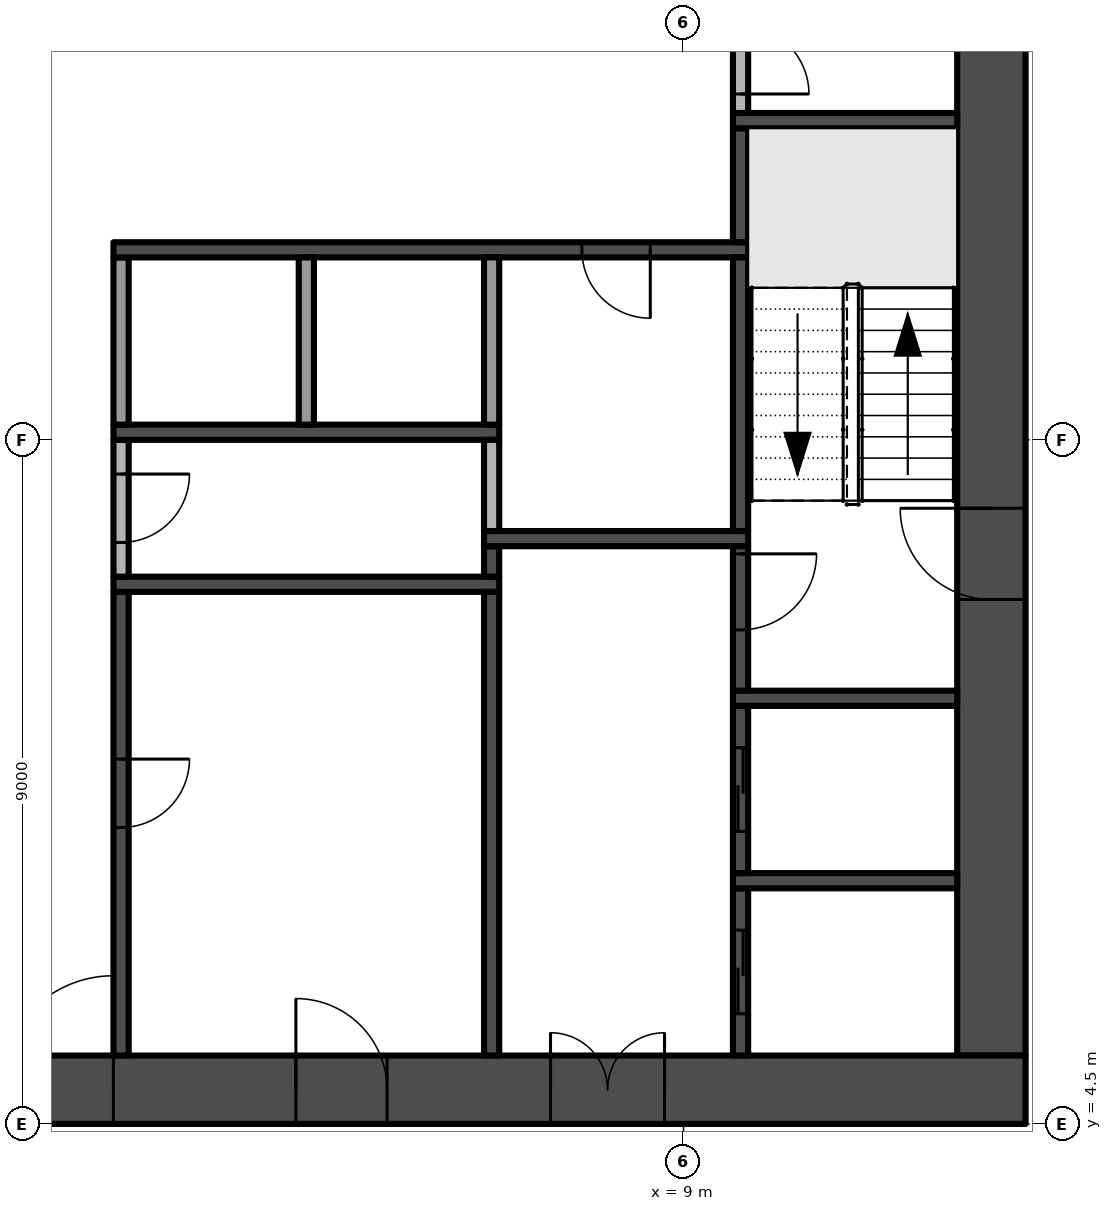
"""IFC4 building model, lengths in metres.
Left out: names, types, materials, properties, quantities, classifications, styles, units other than length and angle.
Written with IfcOpenShell. Run it as: python <this file> out.ifc"""

import sys

from ifc_helpers import new_model, si_unit, direction, frame, frame_2d, origin, place, context, subcontext, project, spatial, rectangle, extrude, element, fill, save


model = new_model("IFC4")
c1 = context("Model", 3, precision=1e-05, world=origin(), true_north=direction((0.0, 1.0)))
c2 = subcontext(c1, "Body", "Model", "MODEL_VIEW")
j1 = project(units=[si_unit("LENGTHUNIT", "METRE"), si_unit("PLANEANGLEUNIT", "RADIAN")], contexts=[c1])
p1 = place(None, origin())
s1 = spatial("IfcSite", under=j1, at=p1, CompositionType="ELEMENT")
p2 = place(p1, origin())
s2 = spatial("IfcBuilding", under=s1, at=p2, CompositionType="ELEMENT")
p3 = place(p2, frame((0.0, 0.0, 22.6)))
s3 = spatial("IfcBuildingStorey", under=s2, at=p3, CompositionType="ELEMENT", Elevation=22.6)
p4 = place(p3, frame((-13.5, 4.95, -0.3), z_axis=(0.0, 0.0, 1.0), x_axis=(1.0, 0.0, 0.0)))
e1 = element("IfcWall", 1, at=p4, inside=s3, PredefinedType="SHEAR", context=c2, shape_type="SweptSolid", body=[
    extrude(rectangle(XDim=27.0, YDim=0.9, at=frame_2d((13.5, 0.0))), origin(), (0.0, 0.0, 1.0), 3.8),
])
p5 = place(p4, frame((12.0, 0.0, 0.3)))
e2 = element("IfcOpeningElement", 2, at=p5, cuts=e1, PredefinedType="OPENING", context=c2, shape_type="SweptSolid", body=[
    extrude(rectangle(XDim=3.0, YDim=2.4, at=frame_2d((1.5, 1.2))), frame((0.0, 0.46, 0.0), z_axis=(0.0, -1.0, 0.0), x_axis=(1.0, 0.0, 0.0)), (0.0, 0.0, 1.0), 0.92),
])
p6 = place(p4, frame((4.9, 0.0, 0.3)))
e3 = element("IfcOpeningElement", 3, at=p6, cuts=e1, PredefinedType="OPENING", context=c2, shape_type="SweptSolid", body=[
    extrude(rectangle(XDim=1.2, YDim=2.2, at=frame_2d((0.6, 1.1))), frame((0.0, 0.46, 0.0), z_axis=(0.0, -1.0, 0.0), x_axis=(1.0, 0.0, 0.0)), (0.0, 0.0, 1.0), 0.92),
])
p7 = place(p4, frame((20.75, 0.0, 0.3)))
e4 = element("IfcOpeningElement", 4, at=p7, cuts=e1, PredefinedType="OPENING", context=c2, shape_type="SweptSolid", body=[
    extrude(rectangle(XDim=1.5, YDim=2.2, at=frame_2d((0.75, 1.1))), frame((0.0, 0.46, 0.0), z_axis=(0.0, -1.0, 0.0), x_axis=(1.0, 0.0, 0.0)), (0.0, 0.0, 1.0), 0.92),
])
p8 = place(p4, frame((17.4, 0.0, 0.3)))
e5 = element("IfcOpeningElement", 5, at=p8, cuts=e1, PredefinedType="OPENING", context=c2, shape_type="SweptSolid", body=[
    extrude(rectangle(XDim=1.2, YDim=2.2, at=frame_2d((0.6, 1.1))), frame((0.0, 0.46, 0.0), z_axis=(0.0, -1.0, 0.0), x_axis=(1.0, 0.0, 0.0)), (0.0, 0.0, 1.0), 0.92),
])
p9 = place(p3, frame((13.05, 5.4, -0.3), z_axis=(0.0, 0.0, 1.0), x_axis=(0.0, 1.0, 0.0)))
e6 = element("IfcWall", 6, at=p9, inside=s3, PredefinedType="SHEAR", context=c2, shape_type="SweptSolid", body=[
    extrude(rectangle(XDim=16.2, YDim=0.9, at=frame_2d((8.1, 0.0))), origin(), (0.0, 0.0, 1.0), 3.8),
])
p10 = place(p9, frame((6.0, 0.0, 0.3)))
e7 = element("IfcOpeningElement", 7, at=p10, cuts=e6, PredefinedType="OPENING", context=c2, shape_type="SweptSolid", body=[
    extrude(rectangle(XDim=1.2, YDim=2.2, at=frame_2d((0.6, 1.1))), frame((0.0, 0.46, 0.0), z_axis=(0.0, -1.0, 0.0), x_axis=(1.0, 0.0, 0.0)), (0.0, 0.0, 1.0), 0.92),
])
p11 = place(p3, frame((1.6, 11.5, 0.0), z_axis=(0.0, 0.0, 1.0), x_axis=(0.0, -1.0, 0.0)))
e8 = element("IfcWall", 8, at=p11, inside=s3, PredefinedType="SHEAR", context=c2, shape_type="SweptSolid", body=[
    extrude(rectangle(XDim=6.1, YDim=0.2, at=frame_2d((3.05, 0.0))), origin(), (0.0, 0.0, 1.0), 3.5),
])
p12 = place(p11, frame((2.2, 0.0, 0.0)))
e9 = element("IfcOpeningElement", 9, at=p12, cuts=e8, PredefinedType="OPENING", context=c2, shape_type="SweptSolid", body=[
    extrude(rectangle(XDim=0.9, YDim=2.1, at=frame_2d((0.45, 1.05))), frame((0.0, 0.11, 0.0), z_axis=(0.0, -1.0, 0.0), x_axis=(1.0, 0.0, 0.0)), (0.0, 0.0, 1.0), 0.22),
])
p13 = place(p3, frame((1.5, 11.6, 0.0), z_axis=(0.0, 0.0, 1.0), x_axis=(1.0, 0.0, 0.0)))
e10 = element("IfcWall", 10, at=p13, inside=s3, PredefinedType="SHEAR", context=c2, shape_type="SweptSolid", body=[
    extrude(rectangle(XDim=5.075, YDim=0.2, at=frame_2d((2.538, 0.0))), origin(), (0.0, 0.0, 1.0), 3.5),
])
p14 = place(p3, frame((1.6, 13.5, 0.0), z_axis=(0.0, 0.0, 1.0), x_axis=(0.0, -1.0, 0.0)))
e11 = element("IfcWall", 11, at=p14, inside=s3, PredefinedType="PARTITIONING", context=c2, shape_type="SweptSolid", body=[
    extrude(rectangle(XDim=1.8, YDim=0.2, at=frame_2d((0.9, 0.0))), origin(), (0.0, 0.0, 1.0), 3.5),
])
p15 = place(p14, frame((0.45, 0.0, 0.0)))
e12 = element("IfcOpeningElement", 12, at=p15, cuts=e11, PredefinedType="OPENING", context=c2, shape_type="SweptSolid", body=[
    extrude(rectangle(XDim=0.9, YDim=2.1, at=frame_2d((0.45, 1.05))), frame((0.0, 0.11, 0.0), z_axis=(0.0, -1.0, 0.0), x_axis=(1.0, 0.0, 0.0)), (0.0, 0.0, 1.0), 0.22),
])
p16 = place(p3, frame((1.5, 13.6, 0.0), z_axis=(0.0, 0.0, 1.0), x_axis=(1.0, 0.0, 0.0)))
e13 = element("IfcWall", 13, at=p16, inside=s3, PredefinedType="SHEAR", context=c2, shape_type="SweptSolid", body=[
    extrude(rectangle(XDim=5.075, YDim=0.2, at=frame_2d((2.538, 0.0))), origin(), (0.0, 0.0, 1.0), 3.5),
])
p17 = place(p3, frame((1.6, 13.7, 0.0), z_axis=(0.0, 0.0, 1.0), x_axis=(0.0, 1.0, 0.0)))
e14 = element("IfcWall", 14, at=p17, inside=s3, PredefinedType="PARTITIONING", context=c2, shape_type="SweptSolid", body=[
    extrude(rectangle(XDim=2.2, YDim=0.2, at=frame_2d((1.1, 0.0))), origin(), (0.0, 0.0, 1.0), 3.5),
])
p18 = place(p3, frame((9.85, 16.0, 0.0), z_axis=(0.0, 0.0, 1.0), x_axis=(-1.0, 0.0, 0.0)))
e15 = element("IfcWall", 15, at=p18, inside=s3, PredefinedType="SHEAR", context=c2, shape_type="SweptSolid", body=[
    extrude(rectangle(XDim=8.35, YDim=0.2, at=frame_2d((4.175, 0.0))), origin(), (0.0, 0.0, 1.0), 3.5),
])
p19 = place(p18, frame((1.288, 0.0, 0.0)))
e16 = element("IfcOpeningElement", 16, at=p19, cuts=e15, PredefinedType="OPENING", context=c2, shape_type="SweptSolid", body=[
    extrude(rectangle(XDim=0.9, YDim=2.1, at=frame_2d((0.45, 1.05))), frame((0.0, 0.11, 0.0), z_axis=(0.0, -1.0, 0.0), x_axis=(1.0, 0.0, 0.0)), (0.0, 0.0, 1.0), 0.22),
])
p20 = place(p3, frame((4.037, 13.7, 0.0), z_axis=(0.0, 0.0, 1.0), x_axis=(0.0, 1.0, 0.0)))
e17 = element("IfcWall", 17, at=p20, inside=s3, PredefinedType="PARTITIONING", context=c2, shape_type="SweptSolid", body=[
    extrude(rectangle(XDim=2.2, YDim=0.2, at=frame_2d((1.1, 0.0))), origin(), (0.0, 0.0, 1.0), 3.5),
])
p21 = place(p3, frame((6.475, 5.4, 0.0), z_axis=(0.0, 0.0, 1.0), x_axis=(0.0, 1.0, 0.0)))
e18 = element("IfcWall", 18, at=p21, inside=s3, PredefinedType="SHEAR", context=c2, shape_type="SweptSolid", body=[
    extrude(rectangle(XDim=6.1, YDim=0.2, at=frame_2d((3.05, 0.0))), origin(), (0.0, 0.0, 1.0), 3.5),
])
p22 = place(p3, frame((6.475, 11.7, 0.0), z_axis=(0.0, 0.0, 1.0), x_axis=(0.0, 1.0, 0.0)))
e19 = element("IfcWall", 19, at=p22, inside=s3, PredefinedType="SHEAR", context=c2, shape_type="SweptSolid", body=[
    extrude(rectangle(XDim=0.4, YDim=0.2, at=frame_2d((0.2, 0.0))), origin(), (0.0, 0.0, 1.0), 3.5),
])
p23 = place(p3, frame((6.375, 12.2, 0.0), z_axis=(0.0, 0.0, 1.0), x_axis=(1.0, 0.0, 0.0)))
e20 = element("IfcWall", 20, at=p23, inside=s3, PredefinedType="SHEAR", context=c2, shape_type="SweptSolid", body=[
    extrude(rectangle(XDim=3.475, YDim=0.2, at=frame_2d((1.738, 0.0))), origin(), (0.0, 0.0, 1.0), 3.5),
])
p24 = place(p3, frame((6.475, 12.3, 0.0), z_axis=(0.0, 0.0, 1.0), x_axis=(0.0, 1.0, 0.0)))
e21 = element("IfcWall", 21, at=p24, inside=s3, PredefinedType="PARTITIONING", context=c2, shape_type="SweptSolid", body=[
    extrude(rectangle(XDim=1.2, YDim=0.2, at=frame_2d((0.6, 0.0))), origin(), (0.0, 0.0, 1.0), 3.5),
])
p25 = place(p3, frame((6.475, 13.7, 0.0), z_axis=(0.0, 0.0, 1.0), x_axis=(0.0, 1.0, 0.0)))
e22 = element("IfcWall", 22, at=p25, inside=s3, PredefinedType="PARTITIONING", context=c2, shape_type="SweptSolid", body=[
    extrude(rectangle(XDim=2.2, YDim=0.2, at=frame_2d((1.1, 0.0))), origin(), (0.0, 0.0, 1.0), 3.5),
])
p26 = place(p3, frame((9.75, 5.4, 0.0), z_axis=(0.0, 0.0, 1.0), x_axis=(0.0, 1.0, 0.0)))
e23 = element("IfcWall", 23, at=p26, inside=s3, PredefinedType="SHEAR", context=c2, shape_type="SweptSolid", body=[
    extrude(rectangle(XDim=2.2, YDim=0.2, at=frame_2d((1.1, 0.0))), origin(), (0.0, 0.0, 1.0), 3.5),
])
p27 = place(p26, frame((0.55, 0.0, 0.0)))
e24 = element("IfcOpeningElement", 24, at=p27, cuts=e23, PredefinedType="OPENING", context=c2, shape_type="SweptSolid", body=[
    extrude(rectangle(XDim=1.1, YDim=2.1, at=frame_2d((0.55, 1.05))), frame((0.0, 0.11, 0.0), z_axis=(0.0, -1.0, 0.0), x_axis=(1.0, 0.0, 0.0)), (0.0, 0.0, 1.0), 0.22),
])
p28 = place(p3, frame((9.65, 7.7, 0.0), z_axis=(0.0, 0.0, 1.0), x_axis=(1.0, 0.0, 0.0)))
e25 = element("IfcWall", 25, at=p28, inside=s3, PredefinedType="SHEAR", context=c2, shape_type="SweptSolid", body=[
    extrude(rectangle(XDim=2.95, YDim=0.2, at=frame_2d((1.475, 0.0))), origin(), (0.0, 0.0, 1.0), 3.5),
])
p29 = place(p3, frame((9.75, 7.8, 0.0), z_axis=(0.0, 0.0, 1.0), x_axis=(0.0, 1.0, 0.0)))
e26 = element("IfcWall", 26, at=p29, inside=s3, PredefinedType="SHEAR", context=c2, shape_type="SweptSolid", body=[
    extrude(rectangle(XDim=2.2, YDim=0.2, at=frame_2d((1.1, 0.0))), origin(), (0.0, 0.0, 1.0), 3.5),
])
p30 = place(p29, frame((0.55, 0.0, 0.0)))
e27 = element("IfcOpeningElement", 27, at=p30, cuts=e26, PredefinedType="OPENING", context=c2, shape_type="SweptSolid", body=[
    extrude(rectangle(XDim=1.1, YDim=2.1, at=frame_2d((0.55, 1.05))), frame((0.0, 0.11, 0.0), z_axis=(0.0, -1.0, 0.0), x_axis=(1.0, 0.0, 0.0)), (0.0, 0.0, 1.0), 0.22),
])
p31 = place(p3, frame((9.65, 10.1, 0.0), z_axis=(0.0, 0.0, 1.0), x_axis=(1.0, 0.0, 0.0)))
e28 = element("IfcWall", 28, at=p31, inside=s3, PredefinedType="SHEAR", context=c2, shape_type="SweptSolid", body=[
    extrude(rectangle(XDim=2.95, YDim=0.2, at=frame_2d((1.475, 0.0))), origin(), (0.0, 0.0, 1.0), 3.5),
])
p32 = place(p3, frame((9.75, 12.1, 0.0), z_axis=(0.0, 0.0, 1.0), x_axis=(0.0, -1.0, 0.0)))
e29 = element("IfcWall", 29, at=p32, inside=s3, PredefinedType="SHEAR", context=c2, shape_type="SweptSolid", body=[
    extrude(rectangle(XDim=1.9, YDim=0.2, at=frame_2d((0.95, 0.0))), origin(), (0.0, 0.0, 1.0), 3.5),
])
p33 = place(p32, frame((0.1, 0.0, 0.0)))
e30 = element("IfcOpeningElement", 30, at=p33, cuts=e29, PredefinedType="OPENING", context=c2, shape_type="SweptSolid", body=[
    extrude(rectangle(XDim=1.0, YDim=2.2, at=frame_2d((0.5, 1.1))), frame((0.0, 0.11, 0.0), z_axis=(0.0, -1.0, 0.0), x_axis=(1.0, 0.0, 0.0)), (0.0, 0.0, 1.0), 0.22),
])
p34 = place(p3, frame((9.75, 12.3, 0.0), z_axis=(0.0, 0.0, 1.0), x_axis=(0.0, 1.0, 0.0)))
e31 = element("IfcWall", 31, at=p34, inside=s3, PredefinedType="SHEAR", context=c2, shape_type="SweptSolid", body=[
    extrude(rectangle(XDim=3.6, YDim=0.2, at=frame_2d((1.8, 0.0))), origin(), (0.0, 0.0, 1.0), 3.5),
])
p35 = place(p3, frame((9.75, 16.1, 0.0), z_axis=(0.0, 0.0, 1.0), x_axis=(0.0, 1.0, 0.0)))
e32 = element("IfcWall", 32, at=p35, inside=s3, PredefinedType="SHEAR", context=c2, shape_type="SweptSolid", body=[
    extrude(rectangle(XDim=1.5, YDim=0.2, at=frame_2d((0.75, 0.0))), origin(), (0.0, 0.0, 1.0), 3.5),
])
p36 = place(p3, frame((9.65, 17.7, 0.0), z_axis=(0.0, 0.0, 1.0), x_axis=(1.0, 0.0, 0.0)))
e33 = element("IfcWall", 33, at=p36, inside=s3, PredefinedType="SHEAR", context=c2, shape_type="SweptSolid", body=[
    extrude(rectangle(XDim=2.95, YDim=0.2, at=frame_2d((1.475, 0.0))), origin(), (0.0, 0.0, 1.0), 3.5),
])
p37 = place(p3, frame((9.75, 19.2, 0.0), z_axis=(0.0, 0.0, 1.0), x_axis=(0.0, -1.0, 0.0)))
e34 = element("IfcWall", 34, at=p37, inside=s3, PredefinedType="PARTITIONING", context=c2, shape_type="SweptSolid", body=[
    extrude(rectangle(XDim=1.4, YDim=0.2, at=frame_2d((0.7, 0.0))), origin(), (0.0, 0.0, 1.0), 3.5),
])
p38 = place(p37, frame((0.25, 0.0, 0.0)))
e35 = element("IfcOpeningElement", 35, at=p38, cuts=e34, PredefinedType="OPENING", context=c2, shape_type="SweptSolid", body=[
    extrude(rectangle(XDim=0.9, YDim=2.1, at=frame_2d((0.45, 1.05))), frame((0.0, 0.11, 0.0), z_axis=(0.0, -1.0, 0.0), x_axis=(1.0, 0.0, 0.0)), (0.0, 0.0, 1.0), 0.22),
])
p39 = place(p5, frame((3.0, 0.0, 0.0), z_axis=(0.0, 0.0, 1.0), x_axis=(-1.0, 0.0, 0.0)))
e36 = element("IfcDoor", 36, at=p39, inside=s3, OperationType="DOUBLE_DOOR_SINGLE_SWING", PredefinedType="DOOR", context=c2, shape_type="SweptSolid", body=[
    extrude(rectangle(XDim=3.0, YDim=2.4, at=frame_2d((1.5, 1.2))), frame((0.0, 0.025, 0.0), z_axis=(0.0, -1.0, 0.0), x_axis=(1.0, 0.0, 0.0)), (0.0, 0.0, 1.0), 0.05),
])
fill(e2, e36)
p40 = place(p10, frame((1.2, 0.0, 0.0), z_axis=(0.0, 0.0, 1.0), x_axis=(-1.0, 0.0, 0.0)))
e37 = element("IfcDoor", 37, at=p40, inside=s3, OperationType="SINGLE_SWING_LEFT", PredefinedType="DOOR", context=c2, shape_type="SweptSolid", body=[
    extrude(rectangle(XDim=1.2, YDim=2.2, at=frame_2d((0.6, 1.1))), frame((0.0, 0.025, 0.0), z_axis=(0.0, -1.0, 0.0), x_axis=(1.0, 0.0, 0.0)), (0.0, 0.0, 1.0), 0.05),
])
fill(e7, e37)
p41 = place(p7, frame((1.5, 0.0, 0.0), z_axis=(0.0, 0.0, 1.0), x_axis=(-1.0, 0.0, 0.0)))
e38 = element("IfcDoor", 38, at=p41, inside=s3, OperationType="DOUBLE_DOOR_SINGLE_SWING", PredefinedType="DOOR", context=c2, shape_type="SweptSolid", body=[
    extrude(rectangle(XDim=1.5, YDim=2.2, at=frame_2d((0.75, 1.1))), frame((0.0, 0.025, 0.0), z_axis=(0.0, -1.0, 0.0), x_axis=(1.0, 0.0, 0.0)), (0.0, 0.0, 1.0), 0.05),
])
fill(e4, e38)
p42 = place(p8, frame((1.2, 0.0, 0.0), z_axis=(0.0, 0.0, 1.0), x_axis=(-1.0, 0.0, 0.0)))
e39 = element("IfcDoor", 39, at=p42, inside=s3, OperationType="SINGLE_SWING_RIGHT", PredefinedType="DOOR", context=c2, shape_type="SweptSolid", body=[
    extrude(rectangle(XDim=1.2, YDim=2.2, at=frame_2d((0.6, 1.1))), frame((0.0, 0.025, 0.0), z_axis=(0.0, -1.0, 0.0), x_axis=(1.0, 0.0, 0.0)), (0.0, 0.0, 1.0), 0.05),
])
fill(e5, e39)
p43 = place(p33, origin())
e40 = element("IfcDoor", 40, at=p43, inside=s3, OperationType="SINGLE_SWING_LEFT", PredefinedType="DOOR", context=c2, shape_type="SweptSolid", body=[
    extrude(rectangle(XDim=1.0, YDim=2.2, at=frame_2d((0.5, 1.1))), frame((0.0, 0.025, 0.0), z_axis=(0.0, -1.0, 0.0), x_axis=(1.0, 0.0, 0.0)), (0.0, 0.0, 1.0), 0.05),
])
fill(e30, e40)
p44 = place(p27, origin())
e41 = element("IfcDoor", 41, at=p44, inside=s3, OperationType="SLIDING_TO_RIGHT", PredefinedType="DOOR", context=c2, shape_type="SweptSolid", body=[
    extrude(rectangle(XDim=1.1, YDim=2.1, at=frame_2d((0.55, 1.05))), frame((0.0, 0.025, 0.0), z_axis=(0.0, -1.0, 0.0), x_axis=(1.0, 0.0, 0.0)), (0.0, 0.0, 1.0), 0.05),
])
fill(e24, e41)
p45 = place(p30, origin())
e42 = element("IfcDoor", 42, at=p45, inside=s3, OperationType="SLIDING_TO_RIGHT", PredefinedType="DOOR", context=c2, shape_type="SweptSolid", body=[
    extrude(rectangle(XDim=1.1, YDim=2.1, at=frame_2d((0.55, 1.05))), frame((0.0, 0.025, 0.0), z_axis=(0.0, -1.0, 0.0), x_axis=(1.0, 0.0, 0.0)), (0.0, 0.0, 1.0), 0.05),
])
fill(e27, e42)
p46 = place(p12, origin())
e43 = element("IfcDoor", 43, at=p46, inside=s3, OperationType="SINGLE_SWING_LEFT", PredefinedType="DOOR", context=c2, shape_type="SweptSolid", body=[
    extrude(rectangle(XDim=0.9, YDim=2.1, at=frame_2d((0.45, 1.05))), frame((0.0, 0.025, 0.0), z_axis=(0.0, -1.0, 0.0), x_axis=(1.0, 0.0, 0.0)), (0.0, 0.0, 1.0), 0.05),
])
fill(e9, e43)
p47 = place(p15, origin())
e44 = element("IfcDoor", 44, at=p47, inside=s3, OperationType="SINGLE_SWING_LEFT", PredefinedType="DOOR", context=c2, shape_type="SweptSolid", body=[
    extrude(rectangle(XDim=0.9, YDim=2.1, at=frame_2d((0.45, 1.05))), frame((0.0, 0.025, 0.0), z_axis=(0.0, -1.0, 0.0), x_axis=(1.0, 0.0, 0.0)), (0.0, 0.0, 1.0), 0.05),
])
fill(e12, e44)
p48 = place(p19, origin())
e45 = element("IfcDoor", 45, at=p48, inside=s3, OperationType="SINGLE_SWING_LEFT", PredefinedType="DOOR", context=c2, shape_type="SweptSolid", body=[
    extrude(rectangle(XDim=0.9, YDim=2.1, at=frame_2d((0.45, 1.05))), frame((0.0, 0.025, 0.0), z_axis=(0.0, -1.0, 0.0), x_axis=(1.0, 0.0, 0.0)), (0.0, 0.0, 1.0), 0.05),
])
fill(e16, e45)
p49 = place(p38, origin())
e46 = element("IfcDoor", 46, at=p49, inside=s3, OperationType="SINGLE_SWING_RIGHT", PredefinedType="DOOR", context=c2, shape_type="SweptSolid", body=[
    extrude(rectangle(XDim=0.9, YDim=2.1, at=frame_2d((0.45, 1.05))), frame((0.0, 0.025, 0.0), z_axis=(0.0, -1.0, 0.0), x_axis=(1.0, 0.0, 0.0)), (0.0, 0.0, 1.0), 0.05),
])
fill(e35, e46)
save(model, sys.argv[1])
